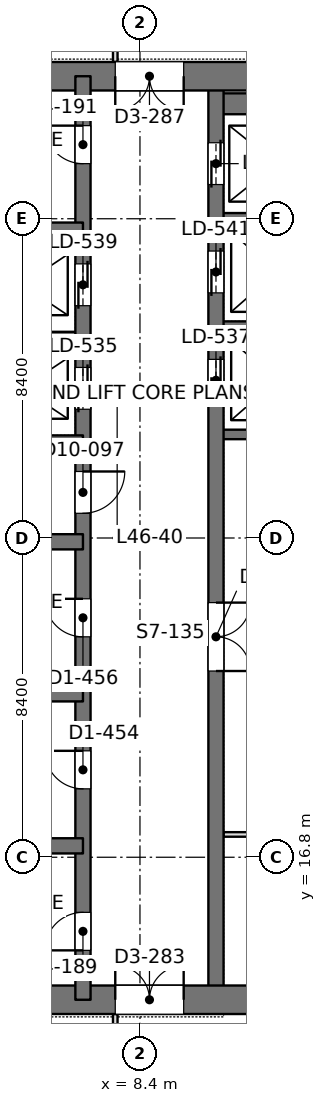
"""IFC4 building model, lengths in metres.
Left out: names, types, materials, properties, quantities, classifications, styles, units other than length and angle.
Written with IfcOpenShell. Run it as: python <this file> out.ifc"""

import sys

from ifc_helpers import new_model, si_unit, direction, frame, frame_2d, origin, place, context, subcontext, project, spatial, rectangle, extrude, element, fill, save


model = new_model("IFC4")
c1 = context("Model", 3, precision=1e-05, world=origin(), true_north=direction((0.0, 1.0)))
c2 = subcontext(c1, "Body", "Model", "MODEL_VIEW")
j1 = project(units=[si_unit("LENGTHUNIT", "METRE"), si_unit("PLANEANGLEUNIT", "RADIAN")], contexts=[c1])
p1 = place(None, origin())
s1 = spatial("IfcSite", under=j1, at=p1, CompositionType="ELEMENT")
p2 = place(p1, origin())
s2 = spatial("IfcBuilding", under=s1, at=p2, CompositionType="ELEMENT")
p3 = place(p2, frame((0.0, 0.0, 202.8)))
s3 = spatial("IfcBuildingStorey", under=s2, at=p3, CompositionType="ELEMENT", Elevation=202.8)
p4 = place(p3, frame((-1.125, 13.05, 0.0), z_axis=(0.0, 0.0, 1.0), x_axis=(1.0, 0.0, 0.0)))
e1 = element("IfcWall", 1, at=p4, inside=s3, PredefinedType="SHEAR", context=c2, shape_type="SweptSolid", body=[
    extrude(rectangle(XDim=17.85, YDim=0.75, at=frame_2d((8.925, 0.0))), origin(), (0.0, 0.0, 1.0), 4.2),
])
p5 = place(p4, frame((8.875, 0.0, 0.0)))
e2 = element("IfcOpeningElement", 2, at=p5, cuts=e1, PredefinedType="OPENING", context=c2, shape_type="SweptSolid", body=[
    extrude(rectangle(XDim=1.8, YDim=2.4, at=frame_2d((0.9, 1.2))), frame((0.0, 0.385, 0.0), z_axis=(0.0, -1.0, 0.0), x_axis=(1.0, 0.0, 0.0)), (0.0, 0.0, 1.0), 0.77),
])
p6 = place(p3, frame((-1.125, 37.35, 0.0), z_axis=(0.0, 0.0, 1.0), x_axis=(1.0, 0.0, 0.0)))
e3 = element("IfcWall", 3, at=p6, inside=s3, PredefinedType="SHEAR", context=c2, shape_type="SweptSolid", body=[
    extrude(rectangle(XDim=17.85, YDim=0.75, at=frame_2d((8.925, 0.0))), origin(), (0.0, 0.0, 1.0), 4.2),
])
p7 = place(p6, frame((8.875, 0.0, 0.0)))
e4 = element("IfcOpeningElement", 4, at=p7, cuts=e3, PredefinedType="OPENING", context=c2, shape_type="SweptSolid", body=[
    extrude(rectangle(XDim=1.8, YDim=2.4, at=frame_2d((0.9, 1.2))), frame((0.0, 0.385, 0.0), z_axis=(0.0, -1.0, 0.0), x_axis=(1.0, 0.0, 0.0)), (0.0, 0.0, 1.0), 0.77),
])
p8 = place(p3, frame((6.9, 13.05, 0.0), z_axis=(0.0, 0.0, 1.0), x_axis=(0.0, 1.0, 0.0)))
e5 = element("IfcWall", 5, at=p8, inside=s3, PredefinedType="SHEAR", context=c2, shape_type="SweptSolid", body=[
    extrude(rectangle(XDim=24.3, YDim=0.4, at=frame_2d((12.15, 0.0))), origin(), (0.0, 0.0, 1.0), 4.2),
])
p9 = place(p8, frame((1.3, 0.0, 0.0)))
e6 = element("IfcOpeningElement", 6, at=p9, cuts=e5, PredefinedType="OPENING", context=c2, shape_type="SweptSolid", body=[
    extrude(rectangle(XDim=1.0, YDim=2.2, at=frame_2d((0.5, 1.1))), frame((0.0, 0.21, 0.0), z_axis=(0.0, -1.0, 0.0), x_axis=(1.0, 0.0, 0.0)), (0.0, 0.0, 1.0), 0.42),
])
p10 = place(p8, frame((22.0, 0.0, 0.0)))
e7 = element("IfcOpeningElement", 7, at=p10, cuts=e5, PredefinedType="OPENING", context=c2, shape_type="SweptSolid", body=[
    extrude(rectangle(XDim=1.0, YDim=2.2, at=frame_2d((0.5, 1.1))), frame((0.0, 0.21, 0.0), z_axis=(0.0, -1.0, 0.0), x_axis=(1.0, 0.0, 0.0)), (0.0, 0.0, 1.0), 0.42),
])
p11 = place(p8, frame((5.55, 0.0, 0.0)))
e8 = element("IfcOpeningElement", 8, at=p11, cuts=e5, PredefinedType="OPENING", context=c2, shape_type="SweptSolid", body=[
    extrude(rectangle(XDim=1.0, YDim=2.2, at=frame_2d((0.5, 1.1))), frame((0.0, 0.21, 0.0), z_axis=(0.0, -1.0, 0.0), x_axis=(1.0, 0.0, 0.0)), (0.0, 0.0, 1.0), 0.42),
])
p12 = place(p8, frame((9.55, 0.0, 0.0)))
e9 = element("IfcOpeningElement", 9, at=p12, cuts=e5, PredefinedType="OPENING", context=c2, shape_type="SweptSolid", body=[
    extrude(rectangle(XDim=1.0, YDim=2.2, at=frame_2d((0.5, 1.1))), frame((0.0, 0.21, 0.0), z_axis=(0.0, -1.0, 0.0), x_axis=(1.0, 0.0, 0.0)), (0.0, 0.0, 1.0), 0.42),
])
p13 = place(p8, frame((12.8, 0.0, 0.0)))
e10 = element("IfcOpeningElement", 10, at=p13, cuts=e5, PredefinedType="OPENING", context=c2, shape_type="SweptSolid", body=[
    extrude(rectangle(XDim=1.1, YDim=2.2, at=frame_2d((0.55, 1.1))), frame((0.0, 0.21, 0.0), z_axis=(0.0, -1.0, 0.0), x_axis=(1.0, 0.0, 0.0)), (0.0, 0.0, 1.0), 0.42),
])
p14 = place(p8, frame((15.538, 0.0, 0.0)))
e11 = element("IfcOpeningElement", 11, at=p14, cuts=e5, PredefinedType="OPENING", context=c2, shape_type="SweptSolid", body=[
    extrude(rectangle(XDim=1.1, YDim=2.2, at=frame_2d((0.55, 1.1))), frame((0.0, 0.21, 0.0), z_axis=(0.0, -1.0, 0.0), x_axis=(1.0, 0.0, 0.0)), (0.0, 0.0, 1.0), 0.42),
])
p15 = place(p8, frame((18.262, 0.0, 0.0)))
e12 = element("IfcOpeningElement", 12, at=p15, cuts=e5, PredefinedType="OPENING", context=c2, shape_type="SweptSolid", body=[
    extrude(rectangle(XDim=1.1, YDim=2.2, at=frame_2d((0.55, 1.1))), frame((0.0, 0.21, 0.0), z_axis=(0.0, -1.0, 0.0), x_axis=(1.0, 0.0, 0.0)), (0.0, 0.0, 1.0), 0.42),
])
p16 = place(p3, frame((10.4, 13.05, 0.0), z_axis=(0.0, 0.0, 1.0), x_axis=(0.0, 1.0, 0.0)))
e13 = element("IfcWall", 13, at=p16, inside=s3, PredefinedType="SHEAR", context=c2, shape_type="SweptSolid", body=[
    extrude(rectangle(XDim=24.3, YDim=0.4, at=frame_2d((12.15, 0.0))), origin(), (0.0, 0.0, 1.0), 4.2),
])
p17 = place(p16, frame((15.75, 0.0, 0.0)))
e14 = element("IfcOpeningElement", 14, at=p17, cuts=e13, PredefinedType="OPENING", context=c2, shape_type="SweptSolid", body=[
    extrude(rectangle(XDim=1.1, YDim=2.2, at=frame_2d((0.55, 1.1))), frame((0.0, 0.21, 0.0), z_axis=(0.0, -1.0, 0.0), x_axis=(1.0, 0.0, 0.0)), (0.0, 0.0, 1.0), 0.42),
])
p18 = place(p16, frame((18.6, 0.0, 0.0)))
e15 = element("IfcOpeningElement", 15, at=p18, cuts=e13, PredefinedType="OPENING", context=c2, shape_type="SweptSolid", body=[
    extrude(rectangle(XDim=1.1, YDim=2.2, at=frame_2d((0.55, 1.1))), frame((0.0, 0.21, 0.0), z_axis=(0.0, -1.0, 0.0), x_axis=(1.0, 0.0, 0.0)), (0.0, 0.0, 1.0), 0.42),
])
p19 = place(p16, frame((21.45, 0.0, 0.0)))
e16 = element("IfcOpeningElement", 16, at=p19, cuts=e13, PredefinedType="OPENING", context=c2, shape_type="SweptSolid", body=[
    extrude(rectangle(XDim=1.1, YDim=2.2, at=frame_2d((0.55, 1.1))), frame((0.0, 0.21, 0.0), z_axis=(0.0, -1.0, 0.0), x_axis=(1.0, 0.0, 0.0)), (0.0, 0.0, 1.0), 0.42),
])
p20 = place(p16, frame((8.65, 0.0, 0.0)))
e17 = element("IfcOpeningElement", 17, at=p20, cuts=e13, PredefinedType="OPENING", context=c2, shape_type="SweptSolid", body=[
    extrude(rectangle(XDim=1.8, YDim=2.4, at=frame_2d((0.9, 1.2))), frame((0.0, 0.21, 0.0), z_axis=(0.0, -1.0, 0.0), x_axis=(1.0, 0.0, 0.0)), (0.0, 0.0, 1.0), 0.42),
])
for number, where, z_axis, x_axis in (
    (18, (-0.75, 17.1, 0.0), (0.0, 0.0, 1.0), (1.0, 0.0, 0.0)),
    (19, (-0.75, 21.1, 0.0), (0.0, 0.0, 1.0), (1.0, 0.0, 0.0)),
    (20, (-0.75, 25.1, 0.0), (0.0, 0.0, 1.0), (1.0, 0.0, 0.0)),
    (21, (-0.75, 27.7, 0.0), (0.0, 0.0, 1.0), (1.0, 0.0, 0.0)),
    (22, (-0.75, 33.3, 0.0), (0.0, 0.0, 1.0), (1.0, 0.0, 0.0)),
):
    element("IfcWall", number, at=place(p3, frame(where, z_axis=z_axis, x_axis=x_axis)), inside=s3, PredefinedType="SHEAR", context=c2, shape_type="SweptSolid", body=[
        extrude(rectangle(XDim=7.65, YDim=0.4, at=frame_2d((3.825, 0.0))), origin(), (0.0, 0.0, 1.0), 4.2),
    ])
p21 = place(p3, frame((3.7, 30.5, 0.0), z_axis=(0.0, 0.0, 1.0), x_axis=(1.0, 0.0, 0.0)))
e23 = element("IfcWall", 23, at=p21, inside=s3, PredefinedType="SHEAR", context=c2, shape_type="SweptSolid", body=[
    extrude(rectangle(XDim=3.2, YDim=0.25, at=frame_2d((1.6, 0.0))), origin(), (0.0, 0.0, 1.0), 4.2),
])
p22 = place(p3, frame((10.4, 27.925, 0.0), z_axis=(0.0, 0.0, 1.0), x_axis=(1.0, 0.0, 0.0)))
e24 = element("IfcWall", 24, at=p22, inside=s3, PredefinedType="SHEAR", context=c2, shape_type="SweptSolid", body=[
    extrude(rectangle(XDim=5.95, YDim=0.25, at=frame_2d((2.975, 0.0))), origin(), (0.0, 0.0, 1.0), 4.2),
])
for number, where, z_axis, x_axis in (
    (25, (10.4, 30.775, 0.0), (0.0, 0.0, 1.0), (1.0, 0.0, 0.0)),
    (26, (10.4, 33.625, 0.0), (0.0, 0.0, 1.0), (1.0, 0.0, 0.0)),
):
    element("IfcWall", number, at=place(p3, frame(where, z_axis=z_axis, x_axis=x_axis)), inside=s3, PredefinedType="SHEAR", context=c2, shape_type="SweptSolid", body=[
        extrude(rectangle(XDim=3.2, YDim=0.25, at=frame_2d((1.6, 0.0))), origin(), (0.0, 0.0, 1.0), 4.2),
    ])
p23 = place(p3, frame((10.4, 36.625, 0.0), z_axis=(0.0, 0.0, 1.0), x_axis=(1.0, 0.0, 0.0)))
e27 = element("IfcWall", 27, at=p23, inside=s3, PredefinedType="SHEAR", context=c2, shape_type="SweptSolid", body=[
    extrude(rectangle(XDim=3.2, YDim=0.55, at=frame_2d((1.6, 0.0))), origin(), (0.0, 0.0, 1.0), 4.2),
])
p24 = place(p3, frame((10.598, 17.4, 0.0), z_axis=(0.0, 0.0, 1.0), x_axis=(1.0, 0.0, 0.0)))
e28 = element("IfcWall", 28, at=p24, inside=s3, PredefinedType="PARTITIONING", context=c2, shape_type="SweptSolid", body=[
    extrude(rectangle(XDim=5.904, YDim=0.12, at=frame_2d((2.952, 0.0))), origin(), (0.0, 0.0, 1.0), 3.55),
])
p25 = place(p3, frame((7.75, 11.158, 0.0), z_axis=(0.0, 0.0, 1.0), x_axis=(0.0, 1.0, 0.0)))
e29 = element("IfcWall", 29, at=p25, inside=s3, PredefinedType="PARTITIONING", context=c2, shape_type="SweptSolid", body=[
    extrude(rectangle(XDim=1.518, YDim=0.12, at=frame_2d((0.759, 0.0))), origin(), (0.0, 0.0, 1.0), 4.05),
])
p26 = place(p25, frame((0.192, 0.0, 0.0)))
e30 = element("IfcOpeningElement", 30, at=p26, cuts=e29, PredefinedType="OPENING", context=c2, shape_type="SweptSolid", body=[
    extrude(rectangle(XDim=1.0, YDim=2.4, at=frame_2d((0.5, 1.2))), frame((0.0, 0.07, 0.0), z_axis=(0.0, -1.0, 0.0), x_axis=(1.0, 0.0, 0.0)), (0.0, 0.0, 1.0), 0.14),
])
p27 = place(p3, frame((7.75, 37.724, 0.0), z_axis=(0.0, 0.0, 1.0), x_axis=(0.0, 1.0, 0.0)))
e31 = element("IfcWall", 31, at=p27, inside=s3, PredefinedType="PARTITIONING", context=c2, shape_type="SweptSolid", body=[
    extrude(rectangle(XDim=1.518, YDim=0.12, at=frame_2d((0.759, 0.0))), origin(), (0.0, 0.0, 1.0), 4.05),
])
p28 = place(p27, frame((0.326, 0.0, 0.0)))
e32 = element("IfcOpeningElement", 32, at=p28, cuts=e31, PredefinedType="OPENING", context=c2, shape_type="SweptSolid", body=[
    extrude(rectangle(XDim=1.0, YDim=2.4, at=frame_2d((0.5, 1.2))), frame((0.0, 0.07, 0.0), z_axis=(0.0, -1.0, 0.0), x_axis=(1.0, 0.0, 0.0)), (0.0, 0.0, 1.0), 0.14),
])
p29 = place(p5, origin())
e33 = element("IfcDoor", 33, at=p29, inside=s3, OperationType="DOUBLE_DOOR_SINGLE_SWING", PredefinedType="DOOR", context=c2, shape_type="SweptSolid", body=[
    extrude(rectangle(XDim=1.8, YDim=2.4, at=frame_2d((0.9, 1.2))), frame((0.0, 0.025, 0.0), z_axis=(0.0, -1.0, 0.0), x_axis=(1.0, 0.0, 0.0)), (0.0, 0.0, 1.0), 0.05),
])
fill(e2, e33)
p30 = place(p7, frame((1.8, 0.0, 0.0), z_axis=(0.0, 0.0, 1.0), x_axis=(-1.0, 0.0, 0.0)))
e34 = element("IfcDoor", 34, at=p30, inside=s3, OperationType="DOUBLE_DOOR_SINGLE_SWING", PredefinedType="DOOR", context=c2, shape_type="SweptSolid", body=[
    extrude(rectangle(XDim=1.8, YDim=2.4, at=frame_2d((0.9, 1.2))), frame((0.0, 0.025, 0.0), z_axis=(0.0, -1.0, 0.0), x_axis=(1.0, 0.0, 0.0)), (0.0, 0.0, 1.0), 0.05),
])
fill(e4, e34)
p31 = place(p9, origin())
e35 = element("IfcDoor", 35, at=p31, inside=s3, OperationType="SINGLE_SWING_LEFT", PredefinedType="DOOR", context=c2, shape_type="SweptSolid", body=[
    extrude(rectangle(XDim=1.0, YDim=2.2, at=frame_2d((0.5, 1.1))), frame((0.0, 0.025, 0.0), z_axis=(0.0, -1.0, 0.0), x_axis=(1.0, 0.0, 0.0)), (0.0, 0.0, 1.0), 0.05),
])
fill(e6, e35)
p32 = place(p10, origin())
e36 = element("IfcDoor", 36, at=p32, inside=s3, OperationType="SINGLE_SWING_RIGHT", PredefinedType="DOOR", context=c2, shape_type="SweptSolid", body=[
    extrude(rectangle(XDim=1.0, YDim=2.2, at=frame_2d((0.5, 1.1))), frame((0.0, 0.025, 0.0), z_axis=(0.0, -1.0, 0.0), x_axis=(1.0, 0.0, 0.0)), (0.0, 0.0, 1.0), 0.05),
])
fill(e7, e36)
p33 = place(p11, origin())
e37 = element("IfcDoor", 37, at=p33, inside=s3, OperationType="SINGLE_SWING_RIGHT", PredefinedType="DOOR", context=c2, shape_type="SweptSolid", body=[
    extrude(rectangle(XDim=1.0, YDim=2.2, at=frame_2d((0.5, 1.1))), frame((0.0, 0.025, 0.0), z_axis=(0.0, -1.0, 0.0), x_axis=(1.0, 0.0, 0.0)), (0.0, 0.0, 1.0), 0.05),
])
fill(e8, e37)
p34 = place(p12, origin())
e38 = element("IfcDoor", 38, at=p34, inside=s3, OperationType="SINGLE_SWING_RIGHT", PredefinedType="DOOR", context=c2, shape_type="SweptSolid", body=[
    extrude(rectangle(XDim=1.0, YDim=2.2, at=frame_2d((0.5, 1.1))), frame((0.0, 0.025, 0.0), z_axis=(0.0, -1.0, 0.0), x_axis=(1.0, 0.0, 0.0)), (0.0, 0.0, 1.0), 0.05),
])
fill(e9, e38)
p35 = place(p13, frame((1.1, 0.0, 0.0), z_axis=(0.0, 0.0, 1.0), x_axis=(-1.0, 0.0, 0.0)))
e39 = element("IfcDoor", 39, at=p35, inside=s3, OperationType="SINGLE_SWING_LEFT", PredefinedType="DOOR", context=c2, shape_type="SweptSolid", body=[
    extrude(rectangle(XDim=1.1, YDim=2.2, at=frame_2d((0.55, 1.1))), frame((0.0, 0.025, 0.0), z_axis=(0.0, -1.0, 0.0), x_axis=(1.0, 0.0, 0.0)), (0.0, 0.0, 1.0), 0.05),
])
fill(e10, e39)
p36 = place(p17, origin())
e40 = element("IfcDoor", 40, at=p36, inside=s3, OperationType="DOUBLE_DOOR_SLIDING", PredefinedType="DOOR", context=c2, shape_type="SweptSolid", body=[
    extrude(rectangle(XDim=1.1, YDim=2.2, at=frame_2d((0.55, 1.1))), frame((0.0, 0.025, 0.0), z_axis=(0.0, -1.0, 0.0), x_axis=(1.0, 0.0, 0.0)), (0.0, 0.0, 1.0), 0.05),
])
fill(e14, e40)
p37 = place(p18, origin())
e41 = element("IfcDoor", 41, at=p37, inside=s3, OperationType="DOUBLE_DOOR_SLIDING", PredefinedType="DOOR", context=c2, shape_type="SweptSolid", body=[
    extrude(rectangle(XDim=1.1, YDim=2.2, at=frame_2d((0.55, 1.1))), frame((0.0, 0.025, 0.0), z_axis=(0.0, -1.0, 0.0), x_axis=(1.0, 0.0, 0.0)), (0.0, 0.0, 1.0), 0.05),
])
fill(e15, e41)
p38 = place(p19, origin())
e42 = element("IfcDoor", 42, at=p38, inside=s3, OperationType="DOUBLE_DOOR_SLIDING", PredefinedType="DOOR", context=c2, shape_type="SweptSolid", body=[
    extrude(rectangle(XDim=1.1, YDim=2.2, at=frame_2d((0.55, 1.1))), frame((0.0, 0.025, 0.0), z_axis=(0.0, -1.0, 0.0), x_axis=(1.0, 0.0, 0.0)), (0.0, 0.0, 1.0), 0.05),
])
fill(e16, e42)
p39 = place(p14, origin())
e43 = element("IfcDoor", 43, at=p39, inside=s3, OperationType="DOUBLE_DOOR_SLIDING", PredefinedType="DOOR", context=c2, shape_type="SweptSolid", body=[
    extrude(rectangle(XDim=1.1, YDim=2.2, at=frame_2d((0.55, 1.1))), frame((0.0, 0.025, 0.0), z_axis=(0.0, -1.0, 0.0), x_axis=(1.0, 0.0, 0.0)), (0.0, 0.0, 1.0), 0.05),
])
fill(e11, e43)
p40 = place(p15, origin())
e44 = element("IfcDoor", 44, at=p40, inside=s3, OperationType="DOUBLE_DOOR_SLIDING", PredefinedType="DOOR", context=c2, shape_type="SweptSolid", body=[
    extrude(rectangle(XDim=1.1, YDim=2.2, at=frame_2d((0.55, 1.1))), frame((0.0, 0.025, 0.0), z_axis=(0.0, -1.0, 0.0), x_axis=(1.0, 0.0, 0.0)), (0.0, 0.0, 1.0), 0.05),
])
fill(e12, e44)
p41 = place(p20, frame((1.8, 0.0, 0.0), z_axis=(0.0, 0.0, 1.0), x_axis=(-1.0, 0.0, 0.0)))
e45 = element("IfcDoor", 45, at=p41, inside=s3, OperationType="DOUBLE_DOOR_SINGLE_SWING", PredefinedType="DOOR", context=c2, shape_type="SweptSolid", body=[
    extrude(rectangle(XDim=1.8, YDim=2.4, at=frame_2d((0.9, 1.2))), frame((0.0, 0.025, 0.0), z_axis=(0.0, -1.0, 0.0), x_axis=(1.0, 0.0, 0.0)), (0.0, 0.0, 1.0), 0.05),
])
fill(e17, e45)
save(model, sys.argv[1])
